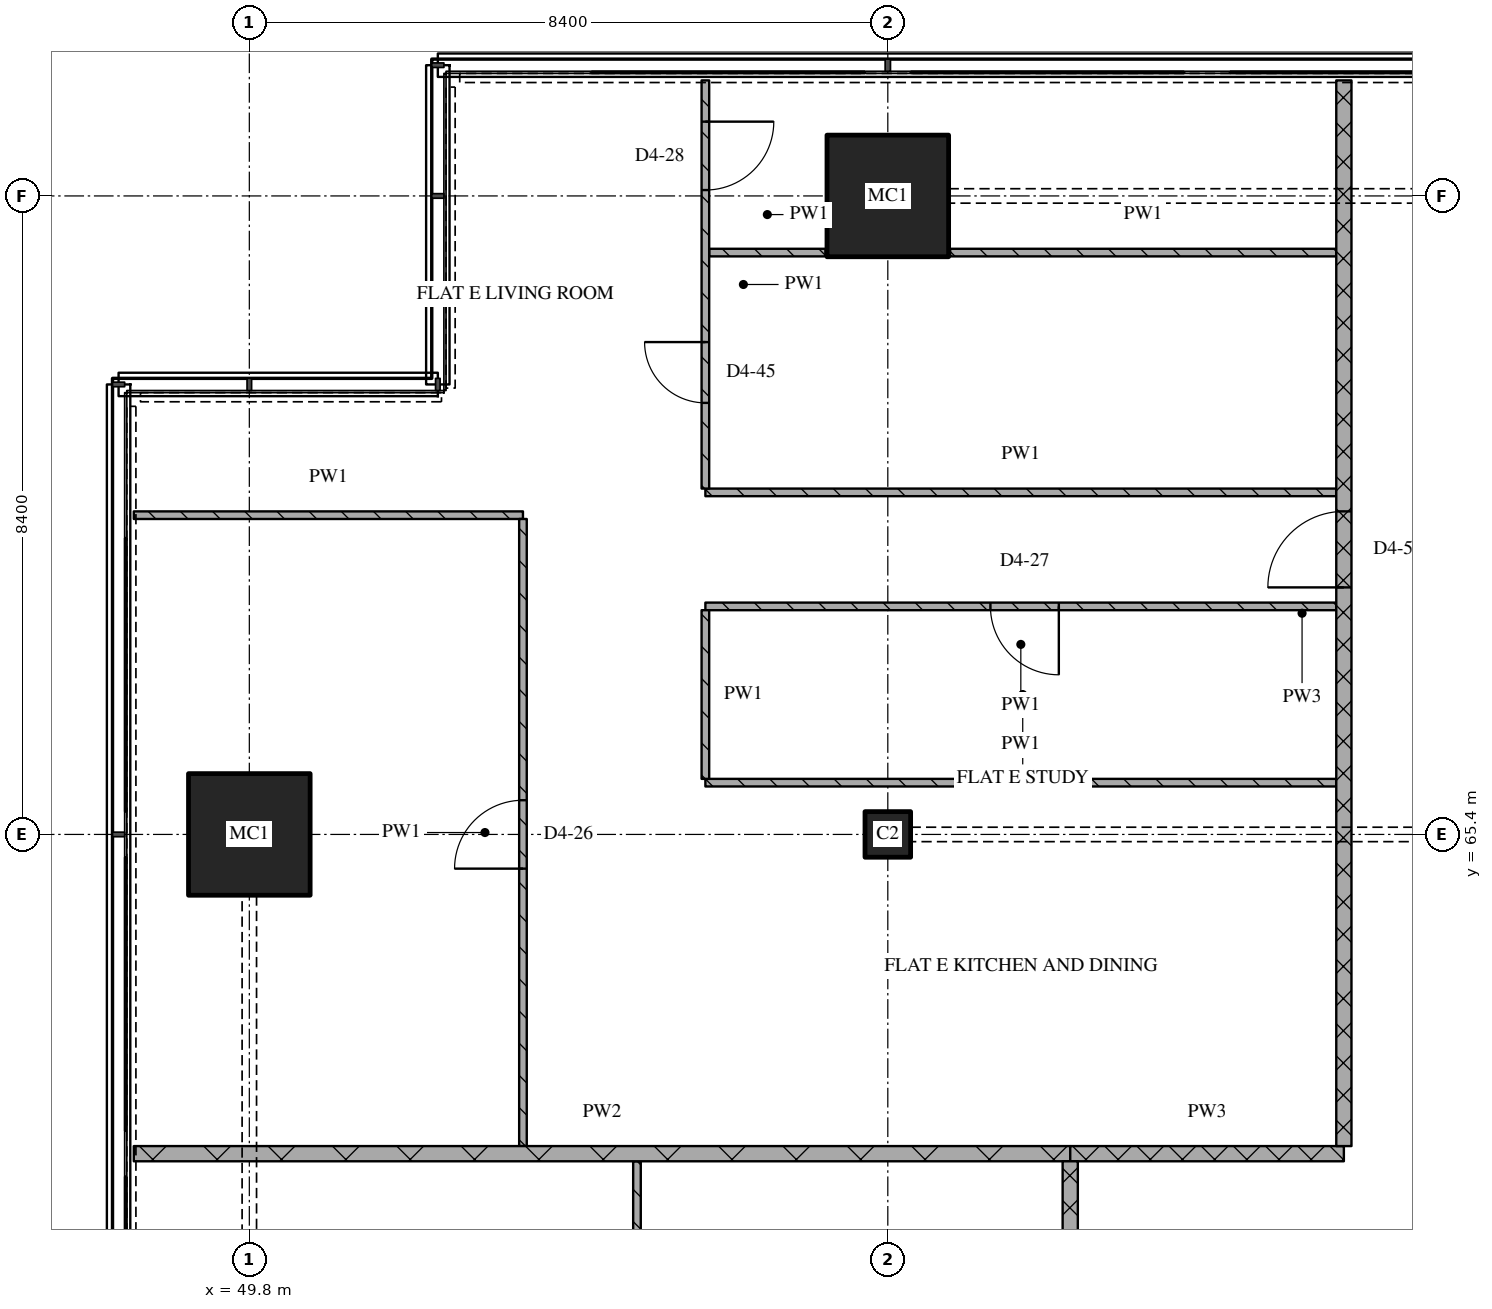
"""IFC4 building model, lengths in metres.
Left out: names, types, materials, properties, quantities, classifications, styles, units other than length and angle.
Written with IfcOpenShell. Run it as: python <this file> out.ifc"""

import sys

from ifc_helpers import new_model, si_unit, direction, frame, frame_2d, origin, origin_2d, place, context, subcontext, project, spatial, rectangle, extrude, element, fill, save


model = new_model("IFC4")
c1 = context("Model", 3, precision=1e-05, world=origin(), true_north=direction((0.0, 1.0)))
c2 = subcontext(c1, "Body", "Model", "MODEL_VIEW")
j1 = project(units=[si_unit("LENGTHUNIT", "METRE"), si_unit("PLANEANGLEUNIT", "RADIAN")], contexts=[c1])
p1 = place(None, origin())
s1 = spatial("IfcSite", under=j1, at=p1, CompositionType="ELEMENT")
p2 = place(p1, origin())
s2 = spatial("IfcBuilding", under=s1, at=p2, CompositionType="ELEMENT")
p3 = place(p2, frame((0.0, 0.0, 245.1)))
s3 = spatial("IfcBuildingStorey", under=s2, at=p3, CompositionType="ELEMENT", Elevation=245.1)
p4 = place(p3, frame((49.8, 65.4, 0.0), z_axis=(0.0, 0.0, 1.0), x_axis=(1.0, 0.0, 0.0)))
e1 = element("IfcColumn", 1, at=p4, inside=s3, PredefinedType="COLUMN", context=c2, shape_type="SweptSolid", body=[
    extrude(rectangle(XDim=1.6, YDim=1.6, at=origin_2d()), origin(), (0.0, 0.0, 1.0), 3.6),
])
p5 = place(p3, frame((58.2, 65.4, 0.0), z_axis=(0.0, 0.0, 1.0), x_axis=(1.0, 0.0, 0.0)))
e2 = element("IfcColumn", 2, at=p5, inside=s3, PredefinedType="COLUMN", context=c2, shape_type="SweptSolid", body=[
    extrude(rectangle(XDim=0.6, YDim=0.6, at=origin_2d()), origin(), (0.0, 0.0, 1.0), 3.6),
])
p6 = place(p3, frame((58.2, 73.8, 0.0), z_axis=(0.0, 0.0, 1.0), x_axis=(1.0, 0.0, 0.0)))
e3 = element("IfcColumn", 3, at=p6, inside=s3, PredefinedType="COLUMN", context=c2, shape_type="SweptSolid", body=[
    extrude(rectangle(XDim=1.6, YDim=1.6, at=origin_2d()), origin(), (0.0, 0.0, 1.0), 3.6),
])
p7 = place(p3, frame((60.6, 61.2, 0.0), z_axis=(0.0, 0.0, 1.0), x_axis=(1.0, 0.0, 0.0)))
e4 = element("IfcWall", 4, at=p7, inside=s3, PredefinedType="PARTITIONING", context=c2, shape_type="SweptSolid", body=[
    extrude(rectangle(XDim=3.6, YDim=0.2, at=frame_2d((1.8, 0.0))), origin(), (0.0, 0.0, 1.0), 3.32),
])
p8 = place(p3, frame((48.28, 61.2, 0.0), z_axis=(0.0, 0.0, 1.0), x_axis=(1.0, 0.0, 0.0)))
e5 = element("IfcWall", 5, at=p8, inside=s3, PredefinedType="PARTITIONING", context=c2, shape_type="SweptSolid", body=[
    extrude(rectangle(XDim=12.32, YDim=0.2, at=frame_2d((6.16, 0.0))), origin(), (0.0, 0.0, 1.0), 3.32),
])
p9 = place(p3, frame((55.8, 66.081, 0.0), z_axis=(0.0, 0.0, 1.0), x_axis=(1.0, 0.0, 0.0)))
e6 = element("IfcWall", 6, at=p9, inside=s3, PredefinedType="PARTITIONING", context=c2, shape_type="SweptSolid", body=[
    extrude(rectangle(XDim=8.3, YDim=0.1, at=frame_2d((4.15, 0.0))), origin(), (0.0, 0.0, 1.0), 3.32),
])
p10 = place(p3, frame((64.1, 68.4, 0.0), z_axis=(0.0, 0.0, 1.0), x_axis=(-1.0, 0.0, 0.0)))
e7 = element("IfcWall", 7, at=p10, inside=s3, PredefinedType="PARTITIONING", context=c2, shape_type="SweptSolid", body=[
    extrude(rectangle(XDim=8.3, YDim=0.1, at=frame_2d((4.15, 0.0))), origin(), (0.0, 0.0, 1.0), 3.32),
])
p11 = place(p10, frame((3.65, 0.0, 0.0)))
e8 = element("IfcOpeningElement", 8, at=p11, cuts=e7, PredefinedType="OPENING", context=c2, shape_type="SweptSolid", body=[
    extrude(rectangle(XDim=0.9, YDim=2.1, at=frame_2d((0.45, 1.05))), frame((0.0, 0.06, 0.0), z_axis=(0.0, -1.0, 0.0), x_axis=(1.0, 0.0, 0.0)), (0.0, 0.0, 1.0), 0.12),
])
p12 = place(p3, frame((48.28, 69.6, 0.0), z_axis=(0.0, 0.0, 1.0), x_axis=(1.0, 0.0, 0.0)))
e9 = element("IfcWall", 9, at=p12, inside=s3, PredefinedType="PARTITIONING", context=c2, shape_type="SweptSolid", body=[
    extrude(rectangle(XDim=5.12, YDim=0.1, at=frame_2d((2.56, 0.0))), origin(), (0.0, 0.0, 1.0), 3.32),
])
p13 = place(p3, frame((55.8, 69.9, 0.0), z_axis=(0.0, 0.0, 1.0), x_axis=(1.0, 0.0, 0.0)))
e10 = element("IfcWall", 10, at=p13, inside=s3, PredefinedType="PARTITIONING", context=c2, shape_type="SweptSolid", body=[
    extrude(rectangle(XDim=8.3, YDim=0.1, at=frame_2d((4.15, 0.0))), origin(), (0.0, 0.0, 1.0), 3.32),
])
p14 = place(p3, frame((55.85, 73.055, 0.0), z_axis=(0.0, 0.0, 1.0), x_axis=(1.0, 0.0, 0.0)))
e11 = element("IfcWall", 11, at=p14, inside=s3, PredefinedType="PARTITIONING", context=c2, shape_type="SweptSolid", body=[
    extrude(rectangle(XDim=1.53, YDim=0.1, at=frame_2d((0.765, 0.0))), origin(), (0.0, 0.0, 1.0), 3.32),
])
p15 = place(p3, frame((59.02, 73.055, 0.0), z_axis=(0.0, 0.0, 1.0), x_axis=(1.0, 0.0, 0.0)))
e12 = element("IfcWall", 12, at=p15, inside=s3, PredefinedType="PARTITIONING", context=c2, shape_type="SweptSolid", body=[
    extrude(rectangle(XDim=5.08, YDim=0.1, at=frame_2d((2.54, 0.0))), origin(), (0.0, 0.0, 1.0), 3.32),
])
p16 = place(p3, frame((53.4, 61.3, 0.0), z_axis=(0.0, 0.0, 1.0), x_axis=(0.0, 1.0, 0.0)))
e13 = element("IfcWall", 13, at=p16, inside=s3, PredefinedType="PARTITIONING", context=c2, shape_type="SweptSolid", body=[
    extrude(rectangle(XDim=8.25, YDim=0.1, at=frame_2d((4.125, 0.0))), origin(), (0.0, 0.0, 1.0), 3.32),
])
p17 = place(p16, frame((3.65, 0.0, 0.0)))
e14 = element("IfcOpeningElement", 14, at=p17, cuts=e13, PredefinedType="OPENING", context=c2, shape_type="SweptSolid", body=[
    extrude(rectangle(XDim=0.9, YDim=2.1, at=frame_2d((0.45, 1.05))), frame((0.0, 0.06, 0.0), z_axis=(0.0, -1.0, 0.0), x_axis=(1.0, 0.0, 0.0)), (0.0, 0.0, 1.0), 0.12),
])
p18 = place(p3, frame((54.9, 61.1, 0.0), z_axis=(0.0, 0.0, 1.0), x_axis=(0.0, -1.0, 0.0)))
e15 = element("IfcWall", 15, at=p18, inside=s3, PredefinedType="PARTITIONING", context=c2, shape_type="SweptSolid", body=[
    extrude(rectangle(XDim=7.65, YDim=0.1, at=frame_2d((3.825, 0.0))), origin(), (0.0, 0.0, 1.0), 3.32),
])
p19 = place(p18, frame((1.15, 0.0, 0.0)))
e16 = element("IfcOpeningElement", 16, at=p19, cuts=e15, PredefinedType="OPENING", context=c2, shape_type="SweptSolid", body=[
    extrude(rectangle(XDim=0.8, YDim=2.1, at=frame_2d((0.4, 1.05))), frame((0.0, 0.06, 0.0), z_axis=(0.0, -1.0, 0.0), x_axis=(1.0, 0.0, 0.0)), (0.0, 0.0, 1.0), 0.12),
])
p20 = place(p18, frame((5.05, 0.0, 0.0)))
e17 = element("IfcOpeningElement", 17, at=p20, cuts=e15, PredefinedType="OPENING", context=c2, shape_type="SweptSolid", body=[
    extrude(rectangle(XDim=0.8, YDim=2.1, at=frame_2d((0.4, 1.05))), frame((0.0, 0.06, 0.0), z_axis=(0.0, -1.0, 0.0), x_axis=(1.0, 0.0, 0.0)), (0.0, 0.0, 1.0), 0.12),
])
p21 = place(p3, frame((55.8, 68.35, 0.0), z_axis=(0.0, 0.0, 1.0), x_axis=(0.0, -1.0, 0.0)))
e18 = element("IfcWall", 18, at=p21, inside=s3, PredefinedType="PARTITIONING", context=c2, shape_type="SweptSolid", body=[
    extrude(rectangle(XDim=2.219, YDim=0.1, at=frame_2d((1.109, 0.0))), origin(), (0.0, 0.0, 1.0), 3.32),
])
p22 = place(p3, frame((55.8, 75.32, 0.0), z_axis=(0.0, 0.0, 1.0), x_axis=(0.0, -1.0, 0.0)))
e19 = element("IfcWall", 19, at=p22, inside=s3, PredefinedType="PARTITIONING", context=c2, shape_type="SweptSolid", body=[
    extrude(rectangle(XDim=5.37, YDim=0.1, at=frame_2d((2.685, 0.0))), origin(), (0.0, 0.0, 1.0), 3.32),
])
p23 = place(p22, frame((0.542, 0.0, 0.0)))
e20 = element("IfcOpeningElement", 20, at=p23, cuts=e19, PredefinedType="OPENING", context=c2, shape_type="SweptSolid", body=[
    extrude(rectangle(XDim=0.9, YDim=2.1, at=frame_2d((0.45, 1.05))), frame((0.0, 0.06, 0.0), z_axis=(0.0, -1.0, 0.0), x_axis=(1.0, 0.0, 0.0)), (0.0, 0.0, 1.0), 0.12),
])
p24 = place(p22, frame((3.443, 0.0, 0.0)))
e21 = element("IfcOpeningElement", 21, at=p24, cuts=e19, PredefinedType="OPENING", context=c2, shape_type="SweptSolid", body=[
    extrude(rectangle(XDim=0.8, YDim=2.1, at=frame_2d((0.4, 1.05))), frame((0.0, 0.06, 0.0), z_axis=(0.0, -1.0, 0.0), x_axis=(1.0, 0.0, 0.0)), (0.0, 0.0, 1.0), 0.12),
])
p25 = place(p3, frame((60.6, 43.3, 0.0), z_axis=(0.0, 0.0, 1.0), x_axis=(0.0, 1.0, 0.0)))
e22 = element("IfcWall", 22, at=p25, inside=s3, PredefinedType="PARTITIONING", context=c2, shape_type="SweptSolid", body=[
    extrude(rectangle(XDim=17.8, YDim=0.2, at=frame_2d((8.9, 0.0))), origin(), (0.0, 0.0, 1.0), 3.32),
])
p26 = place(p25, frame((8.85, 0.0, 0.0)))
e23 = element("IfcOpeningElement", 23, at=p26, cuts=e22, PredefinedType="OPENING", context=c2, shape_type="SweptSolid", body=[
    extrude(rectangle(XDim=1.0, YDim=2.1, at=frame_2d((0.5, 1.05))), frame((0.0, 0.11, 0.0), z_axis=(0.0, -1.0, 0.0), x_axis=(1.0, 0.0, 0.0)), (0.0, 0.0, 1.0), 0.22),
])
p27 = place(p3, frame((64.2, 61.3, 0.0), z_axis=(0.0, 0.0, 1.0), x_axis=(0.0, 1.0, 0.0)))
e24 = element("IfcWall", 24, at=p27, inside=s3, PredefinedType="PARTITIONING", context=c2, shape_type="SweptSolid", body=[
    extrude(rectangle(XDim=14.02, YDim=0.2, at=frame_2d((7.01, 0.0))), origin(), (0.0, 0.0, 1.0), 3.32),
])
p28 = place(p27, frame((7.35, 0.0, 0.0)))
e25 = element("IfcOpeningElement", 25, at=p28, cuts=e24, PredefinedType="OPENING", context=c2, shape_type="SweptSolid", body=[
    extrude(rectangle(XDim=1.0, YDim=2.1, at=frame_2d((0.5, 1.05))), frame((0.0, 0.11, 0.0), z_axis=(0.0, -1.0, 0.0), x_axis=(1.0, 0.0, 0.0)), (0.0, 0.0, 1.0), 0.22),
])
p29 = place(p11, origin())
e26 = element("IfcDoor", 26, at=p29, inside=s3, OperationType="SINGLE_SWING_LEFT", PredefinedType="DOOR", context=c2, shape_type="SweptSolid", body=[
    extrude(rectangle(XDim=0.9, YDim=2.1, at=frame_2d((0.45, 1.05))), frame((0.0, 0.025, 0.0), z_axis=(0.0, -1.0, 0.0), x_axis=(1.0, 0.0, 0.0)), (0.0, 0.0, 1.0), 0.05),
])
fill(e8, e26)
p30 = place(p17, origin())
e27 = element("IfcDoor", 27, at=p30, inside=s3, OperationType="SINGLE_SWING_LEFT", PredefinedType="DOOR", context=c2, shape_type="SweptSolid", body=[
    extrude(rectangle(XDim=0.9, YDim=2.1, at=frame_2d((0.45, 1.05))), frame((0.0, 0.025, 0.0), z_axis=(0.0, -1.0, 0.0), x_axis=(1.0, 0.0, 0.0)), (0.0, 0.0, 1.0), 0.05),
])
fill(e14, e27)
p31 = place(p23, origin())
e28 = element("IfcDoor", 28, at=p31, inside=s3, OperationType="SINGLE_SWING_LEFT", PredefinedType="DOOR", context=c2, shape_type="SweptSolid", body=[
    extrude(rectangle(XDim=0.9, YDim=2.1, at=frame_2d((0.45, 1.05))), frame((0.0, 0.025, 0.0), z_axis=(0.0, -1.0, 0.0), x_axis=(1.0, 0.0, 0.0)), (0.0, 0.0, 1.0), 0.05),
])
fill(e20, e28)
p32 = place(p24, origin())
e29 = element("IfcDoor", 29, at=p32, inside=s3, OperationType="SINGLE_SWING_RIGHT", PredefinedType="DOOR", context=c2, shape_type="SweptSolid", body=[
    extrude(rectangle(XDim=0.8, YDim=2.1, at=frame_2d((0.4, 1.05))), frame((0.0, 0.025, 0.0), z_axis=(0.0, -1.0, 0.0), x_axis=(1.0, 0.0, 0.0)), (0.0, 0.0, 1.0), 0.05),
])
fill(e21, e29)
p33 = place(p28, origin())
e30 = element("IfcDoor", 30, at=p33, inside=s3, OperationType="SINGLE_SWING_LEFT", PredefinedType="DOOR", context=c2, shape_type="SweptSolid", body=[
    extrude(rectangle(XDim=1.0, YDim=2.1, at=frame_2d((0.5, 1.05))), frame((0.0, 0.025, 0.0), z_axis=(0.0, -1.0, 0.0), x_axis=(1.0, 0.0, 0.0)), (0.0, 0.0, 1.0), 0.05),
])
fill(e25, e30)
save(model, sys.argv[1])
